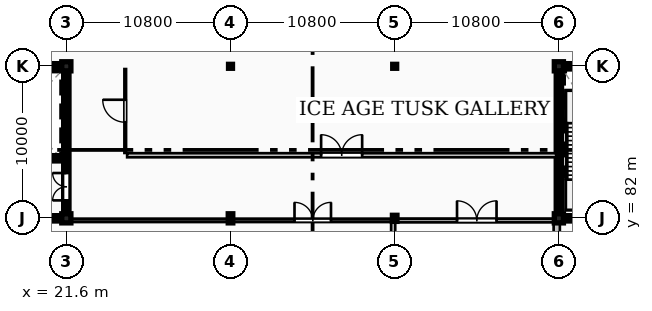
"""IFC4 building model, lengths in metres.
Left out: names, types, materials, properties, quantities, classifications, styles, units other than length and angle.
Written with IfcOpenShell. Run it as: python <this file> out.ifc"""

import sys

from ifc_helpers import new_model, si_unit, direction, frame, frame_2d, origin, origin_2d, place, context, subcontext, project, spatial, rectangle, hollow_rectangle, i_section, extrude, element, fill, save


model = new_model("IFC4")
c1 = context("Model", 3, precision=1e-05, world=origin(), true_north=direction((0.0, 1.0)))
c2 = subcontext(c1, "Body", "Model", "MODEL_VIEW")
j1 = project(units=[si_unit("LENGTHUNIT", "METRE"), si_unit("PLANEANGLEUNIT", "RADIAN")], contexts=[c1])
p1 = place(None, origin())
s1 = spatial("IfcSite", under=j1, at=p1, CompositionType="ELEMENT")
p2 = place(p1, origin())
s2 = spatial("IfcBuilding", under=s1, at=p2, CompositionType="ELEMENT")
p3 = place(p2, frame((0.0, 0.0, 14.4)))
s3 = spatial("IfcBuildingStorey", under=s2, at=p3, CompositionType="ELEMENT", Elevation=14.4)
for number, where, z_axis, x_axis in (
    (1, (21.6, 82.0, 0.0), (0.0, 0.0, 1.0), (1.0, 0.0, 0.0)),
    (2, (21.6, 92.0, 0.0), (0.0, 0.0, 1.0), (1.0, 0.0, 0.0)),
):
    element("IfcColumn", number, at=place(p3, frame(where, z_axis=z_axis, x_axis=x_axis)), inside=s3, PredefinedType="COLUMN", context=c2, shape_type="SweptSolid", body=[
        extrude(rectangle(XDim=0.6, YDim=0.6, at=origin_2d()), origin(), (0.0, 0.0, 1.0), 9.6),
    ])
p4 = place(p3, frame((32.4, 82.0, 0.0), z_axis=(0.0, 0.0, 1.0), x_axis=(1.0, 0.0, 0.0)))
e3 = element("IfcColumn", 3, at=p4, inside=s3, PredefinedType="COLUMN", context=c2, shape_type="SweptSolid", body=[
    extrude(i_section(OverallWidth=0.3, OverallDepth=0.6, WebThickness=0.015, FlangeThickness=0.03, FilletRadius=0.027, at=origin_2d()), origin(), (0.0, 0.0, 1.0), 9.6),
])
p5 = place(p3, frame((32.4, 92.0, 0.0), z_axis=(0.0, 0.0, 1.0), x_axis=(1.0, 0.0, 0.0)))
e4 = element("IfcColumn", 4, at=p5, inside=s3, PredefinedType="COLUMN", context=c2, shape_type="SweptSolid", body=[
    extrude(hollow_rectangle(XDim=0.26, YDim=0.26, WallThickness=0.014, InnerFilletRadius=0.014, OuterFilletRadius=0.028, at=origin_2d()), origin(), (0.0, 0.0, 1.0), 9.6),
])
p6 = place(p3, frame((43.2, 82.0, 0.0), z_axis=(0.0, 0.0, 1.0), x_axis=(1.0, 0.0, 0.0)))
e5 = element("IfcColumn", 5, at=p6, inside=s3, PredefinedType="COLUMN", context=c2, shape_type="SweptSolid", body=[
    extrude(i_section(OverallWidth=0.3, OverallDepth=0.4, WebThickness=0.013, FlangeThickness=0.024, FilletRadius=0.027, at=origin_2d()), origin(), (0.0, 0.0, 1.0), 9.6),
])
p7 = place(p3, frame((43.2, 92.0, 0.0), z_axis=(0.0, 0.0, 1.0), x_axis=(1.0, 0.0, 0.0)))
e6 = element("IfcColumn", 6, at=p7, inside=s3, PredefinedType="COLUMN", context=c2, shape_type="SweptSolid", body=[
    extrude(hollow_rectangle(XDim=0.26, YDim=0.26, WallThickness=0.014, InnerFilletRadius=0.014, OuterFilletRadius=0.028, at=origin_2d()), origin(), (0.0, 0.0, 1.0), 9.6),
])
for number, where, z_axis, x_axis in (
    (7, (54.0, 82.0, 0.0), (0.0, 0.0, 1.0), (1.0, 0.0, 0.0)),
    (8, (54.0, 92.0, 0.0), (0.0, 0.0, 1.0), (1.0, 0.0, 0.0)),
):
    element("IfcColumn", number, at=place(p3, frame(where, z_axis=z_axis, x_axis=x_axis)), inside=s3, PredefinedType="COLUMN", context=c2, shape_type="SweptSolid", body=[
        extrude(rectangle(XDim=0.6, YDim=0.6, at=origin_2d()), origin(), (0.0, 0.0, 1.0), 9.6),
    ])
for number, where, z_axis, x_axis in (
    (9, (11.1, 82.0, 0.0), (0.0, 0.0, 1.0), (1.0, 0.0, 0.0)),
    (10, (11.1, 92.0, 0.0), (0.0, 0.0, 1.0), (1.0, 0.0, 0.0)),
):
    element("IfcWall", number, at=place(p3, frame(where, z_axis=z_axis, x_axis=x_axis)), inside=s3, PredefinedType="SHEAR", context=c2, shape_type="SweptSolid", body=[
        extrude(rectangle(XDim=10.2, YDim=0.35, at=frame_2d((5.1, 0.0))), origin(), (0.0, 0.0, 1.0), 9.36),
    ])
p8 = place(p3, frame((21.6, 82.3, 0.0), z_axis=(0.0, 0.0, 1.0), x_axis=(0.0, 1.0, 0.0)))
e11 = element("IfcWall", 11, at=p8, inside=s3, PredefinedType="SHEAR", context=c2, shape_type="SweptSolid", body=[
    extrude(rectangle(XDim=9.4, YDim=0.35, at=frame_2d((4.7, 0.0))), origin(), (0.0, 0.0, 1.0), 9.36),
])
p9 = place(p8, frame((0.88, 0.0, 0.0)))
e12 = element("IfcOpeningElement", 12, at=p9, cuts=e11, PredefinedType="OPENING", context=c2, shape_type="SweptSolid", body=[
    extrude(rectangle(XDim=1.8, YDim=2.25, at=frame_2d((0.9, 1.125))), frame((0.0, 0.185, 0.0), z_axis=(0.0, -1.0, 0.0), x_axis=(1.0, 0.0, 0.0)), (0.0, 0.0, 1.0), 0.37),
])
p10 = place(p3, frame((15.93, 85.95, 0.0), z_axis=(0.0, 0.0, 1.0), x_axis=(1.0, 0.0, 0.0)))
e13 = element("IfcWall", 13, at=p10, inside=s3, PredefinedType="SHEAR", context=c2, shape_type="SweptSolid", body=[
    extrude(rectangle(XDim=5.49, YDim=0.35, at=frame_2d((2.745, 0.0))), origin(), (0.0, 0.0, 1.0), 9.36),
])
p11 = place(p10, frame((0.65, 0.0, 0.0)))
e14 = element("IfcOpeningElement", 14, at=p11, cuts=e13, PredefinedType="OPENING", context=c2, shape_type="SweptSolid", body=[
    extrude(rectangle(XDim=1.1, YDim=2.2, at=frame_2d((0.55, 1.1))), frame((0.0, 0.185, 0.0), z_axis=(0.0, -1.0, 0.0), x_axis=(1.0, 0.0, 0.0)), (0.0, 0.0, 1.0), 0.37),
])
p12 = place(p10, frame((2.85, 0.0, 0.0)))
e15 = element("IfcOpeningElement", 15, at=p12, cuts=e13, PredefinedType="OPENING", context=c2, shape_type="SweptSolid", body=[
    extrude(rectangle(XDim=1.1, YDim=2.2, at=frame_2d((0.55, 1.1))), frame((0.0, 0.185, 0.0), z_axis=(0.0, -1.0, 0.0), x_axis=(1.0, 0.0, 0.0)), (0.0, 0.0, 1.0), 0.37),
])
for number, where, z_axis, x_axis in (
    (16, (54.3, 82.0, 0.0), (0.0, 0.0, 1.0), (1.0, 0.0, 0.0)),
    (17, (54.3, 92.0, 0.0), (0.0, 0.0, 1.0), (1.0, 0.0, 0.0)),
):
    element("IfcWall", number, at=place(p3, frame(where, z_axis=z_axis, x_axis=x_axis)), inside=s3, PredefinedType="SHEAR", context=c2, shape_type="SweptSolid", body=[
        extrude(rectangle(XDim=10.2, YDim=0.35, at=frame_2d((5.1, 0.0))), origin(), (0.0, 0.0, 1.0), 9.36),
    ])
p13 = place(p3, frame((54.0, 82.3, 0.0), z_axis=(0.0, 0.0, 1.0), x_axis=(0.0, 1.0, 0.0)))
e18 = element("IfcWall", 18, at=p13, inside=s3, PredefinedType="SHEAR", context=c2, shape_type="SweptSolid", body=[
    extrude(rectangle(XDim=9.4, YDim=0.35, at=frame_2d((4.7, 0.0))), origin(), (0.0, 0.0, 1.0), 9.36),
])
p14 = place(p3, frame((21.78, 81.85, 0.0), z_axis=(0.0, 0.0, 1.0), x_axis=(1.0, 0.0, 0.0)))
e19 = element("IfcWall", 19, at=p14, inside=s3, PredefinedType="PARTITIONING", context=c2, shape_type="SweptSolid", body=[
    extrude(rectangle(XDim=10.42, YDim=0.19, at=frame_2d((5.21, 0.0))), origin(), (0.0, 0.0, 1.0), 8.759),
])
p15 = place(p3, frame((32.6, 81.85, 0.0), z_axis=(0.0, 0.0, 1.0), x_axis=(1.0, 0.0, 0.0)))
e20 = element("IfcWall", 20, at=p15, inside=s3, PredefinedType="PARTITIONING", context=c2, shape_type="SweptSolid", body=[
    extrude(rectangle(XDim=10.42, YDim=0.19, at=frame_2d((5.21, 0.0))), origin(), (0.0, 0.0, 1.0), 8.96),
])
p16 = place(p15, frame((4.01, 0.0, 0.0)))
e21 = element("IfcOpeningElement", 21, at=p16, cuts=e20, PredefinedType="OPENING", context=c2, shape_type="SweptSolid", body=[
    extrude(rectangle(XDim=2.4, YDim=2.8, at=frame_2d((1.2, 1.4))), frame((0.0, 0.105, 0.0), z_axis=(0.0, -1.0, 0.0), x_axis=(1.0, 0.0, 0.0)), (0.0, 0.0, 1.0), 0.21),
])
p17 = place(p3, frame((43.38, 81.85, 0.0), z_axis=(0.0, 0.0, 1.0), x_axis=(1.0, 0.0, 0.0)))
e22 = element("IfcWall", 22, at=p17, inside=s3, PredefinedType="PARTITIONING", context=c2, shape_type="SweptSolid", body=[
    extrude(rectangle(XDim=10.44, YDim=0.23, at=frame_2d((5.22, 0.0))), origin(), (0.0, 0.0, 1.0), 8.96),
])
p18 = place(p17, frame((3.92, 0.0, 0.0)))
e23 = element("IfcOpeningElement", 23, at=p18, cuts=e22, PredefinedType="OPENING", context=c2, shape_type="SweptSolid", body=[
    extrude(rectangle(XDim=2.6, YDim=2.8, at=frame_2d((1.3, 1.4))), frame((0.0, 0.125, 0.0), z_axis=(0.0, -1.0, 0.0), x_axis=(1.0, 0.0, 0.0)), (0.0, 0.0, 1.0), 0.25),
])
p19 = place(p3, frame((25.6, 86.15, 0.0), z_axis=(0.0, 0.0, 1.0), x_axis=(1.0, 0.0, 0.0)))
e24 = element("IfcWall", 24, at=p19, inside=s3, PredefinedType="PARTITIONING", context=c2, shape_type="SweptSolid", body=[
    extrude(rectangle(XDim=28.22, YDim=0.27, at=frame_2d((14.11, 0.0))), origin(), (0.0, 0.0, 1.0), 9.32),
])
p20 = place(p19, frame((12.76, 0.0, 0.0)))
e25 = element("IfcOpeningElement", 25, at=p20, cuts=e24, PredefinedType="OPENING", context=c2, shape_type="SweptSolid", body=[
    extrude(rectangle(XDim=2.7, YDim=2.85, at=frame_2d((1.35, 1.425))), frame((0.0, 0.145, 0.0), z_axis=(0.0, -1.0, 0.0), x_axis=(1.0, 0.0, 0.0)), (0.0, 0.0, 1.0), 0.29),
])
p21 = place(p3, frame((25.475, 86.3, 0.0), z_axis=(0.0, 0.0, 1.0), x_axis=(0.0, 1.0, 0.0)))
e26 = element("IfcWall", 26, at=p21, inside=s3, PredefinedType="PARTITIONING", context=c2, shape_type="SweptSolid", body=[
    extrude(rectangle(XDim=5.52, YDim=0.11, at=frame_2d((2.76, 0.0))), origin(), (0.0, 0.0, 1.0), 9.32),
])
p22 = place(p21, frame((2.02, 0.0, 0.0)))
e27 = element("IfcOpeningElement", 27, at=p22, cuts=e26, PredefinedType="OPENING", context=c2, shape_type="SweptSolid", body=[
    extrude(rectangle(XDim=1.48, YDim=2.42, at=frame_2d((0.74, 1.21))), frame((0.0, 0.065, 0.0), z_axis=(0.0, -1.0, 0.0), x_axis=(1.0, 0.0, 0.0)), (0.0, 0.0, 1.0), 0.13),
])
p23 = place(p3, frame((43.1, 72.2, 0.0), z_axis=(0.0, 0.0, 1.0), x_axis=(0.0, 1.0, 0.0)))
e28 = element("IfcWall", 28, at=p23, inside=s3, PredefinedType="PARTITIONING", context=c2, shape_type="SweptSolid", body=[
    extrude(rectangle(XDim=9.62, YDim=0.27, at=frame_2d((4.81, 0.0))), origin(), (0.0, 0.0, 1.0), 9.32),
])
p24 = place(p3, frame((53.86, 72.2, 0.0), z_axis=(0.0, 0.0, 1.0), x_axis=(0.0, 1.0, 0.0)))
e29 = element("IfcWall", 29, at=p24, inside=s3, PredefinedType="PARTITIONING", context=c2, shape_type="SweptSolid", body=[
    extrude(rectangle(XDim=9.62, YDim=0.41, at=frame_2d((4.81, 0.0))), origin(), (0.0, 0.0, 1.0), 9.32),
])
p25 = place(p9, origin())
e30 = element("IfcDoor", 30, at=p25, inside=s3, OperationType="DOUBLE_DOOR_SINGLE_SWING", PredefinedType="DOOR", context=c2, shape_type="SweptSolid", body=[
    extrude(rectangle(XDim=1.8, YDim=2.25, at=frame_2d((0.9, 1.125))), frame((0.0, 0.025, 0.0), z_axis=(0.0, -1.0, 0.0), x_axis=(1.0, 0.0, 0.0)), (0.0, 0.0, 1.0), 0.05),
])
fill(e12, e30)
p26 = place(p16, origin())
e31 = element("IfcDoor", 31, at=p26, inside=s3, OperationType="DOUBLE_DOOR_SINGLE_SWING", PredefinedType="DOOR", context=c2, shape_type="SweptSolid", body=[
    extrude(rectangle(XDim=2.4, YDim=2.8, at=frame_2d((1.2, 1.4))), frame((0.0, 0.025, 0.0), z_axis=(0.0, -1.0, 0.0), x_axis=(1.0, 0.0, 0.0)), (0.0, 0.0, 1.0), 0.05),
])
fill(e21, e31)
p27 = place(p18, origin())
e32 = element("IfcDoor", 32, at=p27, inside=s3, OperationType="DOUBLE_DOOR_SINGLE_SWING", PredefinedType="DOOR", context=c2, shape_type="SweptSolid", body=[
    extrude(rectangle(XDim=2.6, YDim=2.8, at=frame_2d((1.3, 1.4))), frame((0.0, 0.025, 0.0), z_axis=(0.0, -1.0, 0.0), x_axis=(1.0, 0.0, 0.0)), (0.0, 0.0, 1.0), 0.05),
])
fill(e23, e32)
p28 = place(p20, origin())
e33 = element("IfcDoor", 33, at=p28, inside=s3, OperationType="DOUBLE_DOOR_SINGLE_SWING", PredefinedType="DOOR", context=c2, shape_type="SweptSolid", body=[
    extrude(rectangle(XDim=2.7, YDim=2.85, at=frame_2d((1.35, 1.425))), frame((0.0, 0.025, 0.0), z_axis=(0.0, -1.0, 0.0), x_axis=(1.0, 0.0, 0.0)), (0.0, 0.0, 1.0), 0.05),
])
fill(e25, e33)
p29 = place(p22, origin())
e34 = element("IfcDoor", 34, at=p29, inside=s3, OperationType="SINGLE_SWING_RIGHT", PredefinedType="DOOR", context=c2, shape_type="SweptSolid", body=[
    extrude(rectangle(XDim=1.48, YDim=2.42, at=frame_2d((0.74, 1.21))), frame((0.0, 0.025, 0.0), z_axis=(0.0, -1.0, 0.0), x_axis=(1.0, 0.0, 0.0)), (0.0, 0.0, 1.0), 0.05),
])
fill(e27, e34)
save(model, sys.argv[1])
